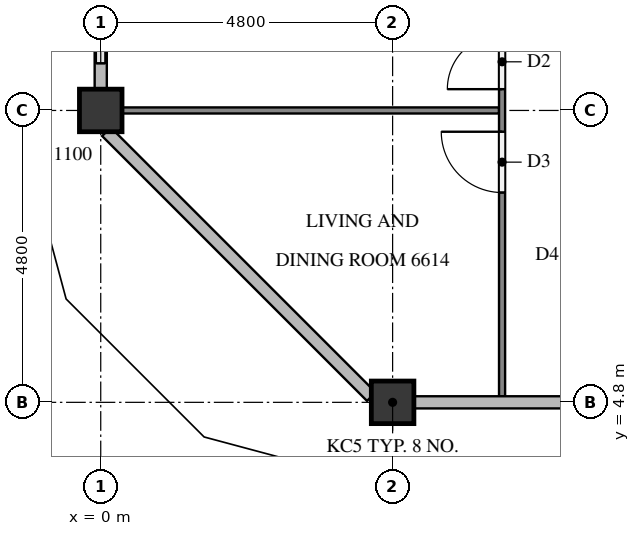
"""IFC4 building model, lengths in metres.
Left out: names, types, materials, properties, quantities, classifications, styles, units other than length and angle.
Written with IfcOpenShell. Run it as: python <this file> out.ifc"""

import sys

from ifc_helpers import new_model, si_unit, direction, frame, frame_2d, origin, origin_2d, place, context, subcontext, project, spatial, rectangle, extrude, element, fill, save


model = new_model("IFC4")
c1 = context("Model", 3, precision=1e-05, world=origin(), true_north=direction((0.0, 1.0)))
c2 = subcontext(c1, "Body", "Model", "MODEL_VIEW")
j1 = project(units=[si_unit("LENGTHUNIT", "METRE"), si_unit("PLANEANGLEUNIT", "RADIAN")], contexts=[c1])
p1 = place(None, origin())
s1 = spatial("IfcSite", under=j1, at=p1, CompositionType="ELEMENT")
p2 = place(p1, origin())
s2 = spatial("IfcBuilding", under=s1, at=p2, CompositionType="ELEMENT")
p3 = place(p2, frame((0.0, 0.0, 252.7)))
s3 = spatial("IfcBuildingStorey", under=s2, at=p3, CompositionType="ELEMENT", Elevation=252.7)
for number, where, z_axis, x_axis in (
    (1, (4.8, 4.8, 0.0), (0.0, 0.0, 1.0), (1.0, 0.0, 0.0)),
    (2, (0.0, 9.6, 0.0), (0.0, 0.0, 1.0), (1.0, 0.0, 0.0)),
):
    element("IfcColumn", number, at=place(p3, frame(where, z_axis=z_axis, x_axis=x_axis)), inside=s3, PredefinedType="COLUMN", context=c2, shape_type="SweptSolid", body=[
        extrude(rectangle(XDim=0.7, YDim=0.7, at=origin_2d()), origin(), (0.0, 0.0, 1.0), 3.2),
    ])
p4 = place(p3, frame((0.0, 12.0, 0.0), z_axis=(0.0, 0.0, 1.0), x_axis=(0.0, -1.0, 0.0)))
e3 = element("IfcWall", 3, at=p4, inside=s3, PredefinedType="SOLIDWALL", context=c2, shape_type="SweptSolid", body=[
    extrude(rectangle(XDim=2.05, YDim=0.15, at=frame_2d((1.025, 0.0))), origin(), (0.0, 0.0, 1.0), 3.2),
])
p5 = place(p4, frame((0.425, 0.0, 0.9)))
e4 = element("IfcOpeningElement", 4, at=p5, cuts=e3, PredefinedType="OPENING", context=c2, shape_type="SweptSolid", body=[
    extrude(rectangle(XDim=1.2, YDim=1.4, at=frame_2d((0.6, 0.7))), frame((0.0, 0.085, 0.0), z_axis=(0.0, -1.0, 0.0), x_axis=(1.0, 0.0, 0.0)), (0.0, 0.0, 1.0), 0.17),
])
p6 = place(p3, frame((6.55, 9.6, 0.0), z_axis=(0.0, 0.0, 1.0), x_axis=(-1.0, 0.0, 0.0)))
e5 = element("IfcWall", 5, at=p6, inside=s3, PredefinedType="PARTITIONING", context=c2, shape_type="SweptSolid", body=[
    extrude(rectangle(XDim=6.2, YDim=0.1, at=frame_2d((3.1, 0.0))), origin(), (0.0, 0.0, 1.0), 3.2),
])
p7 = place(p3, frame((6.6, 4.9, 0.0), z_axis=(0.0, 0.0, 1.0), x_axis=(0.0, 1.0, 0.0)))
e6 = element("IfcWall", 6, at=p7, inside=s3, PredefinedType="PARTITIONING", context=c2, shape_type="SweptSolid", body=[
    extrude(rectangle(XDim=9.4, YDim=0.1, at=frame_2d((4.7, 0.0))), origin(), (0.0, 0.0, 1.0), 3.2),
])
p8 = place(p7, frame((5.05, 0.0, 0.0)))
e7 = element("IfcOpeningElement", 7, at=p8, cuts=e6, PredefinedType="OPENING", context=c2, shape_type="SweptSolid", body=[
    extrude(rectangle(XDim=0.9, YDim=2.1, at=frame_2d((0.45, 1.05))), frame((0.0, 0.06, 0.0), z_axis=(0.0, -1.0, 0.0), x_axis=(1.0, 0.0, 0.0)), (0.0, 0.0, 1.0), 0.12),
])
p9 = place(p7, frame((3.35, 0.0, 0.0)))
e8 = element("IfcOpeningElement", 8, at=p9, cuts=e6, PredefinedType="OPENING", context=c2, shape_type="SweptSolid", body=[
    extrude(rectangle(XDim=1.0, YDim=2.1, at=frame_2d((0.5, 1.05))), frame((0.0, 0.06, 0.0), z_axis=(0.0, -1.0, 0.0), x_axis=(1.0, 0.0, 0.0)), (0.0, 0.0, 1.0), 0.12),
])
p10 = place(p5, origin())
e9 = element("IfcWindow", 9, at=p10, inside=s3, PartitioningType="SINGLE_PANEL", PredefinedType="WINDOW", context=c2, shape_type="SweptSolid", body=[
    extrude(rectangle(XDim=1.2, YDim=1.4, at=frame_2d((0.6, 0.7))), frame((0.0, 0.03, 0.0), z_axis=(0.0, -1.0, 0.0), x_axis=(1.0, 0.0, 0.0)), (0.0, 0.0, 1.0), 0.06),
])
fill(e4, e9)
p11 = place(p8, origin())
e10 = element("IfcDoor", 10, at=p11, inside=s3, OperationType="SINGLE_SWING_LEFT", PredefinedType="DOOR", context=c2, shape_type="SweptSolid", body=[
    extrude(rectangle(XDim=0.9, YDim=2.1, at=frame_2d((0.45, 1.05))), frame((0.0, 0.025, 0.0), z_axis=(0.0, -1.0, 0.0), x_axis=(1.0, 0.0, 0.0)), (0.0, 0.0, 1.0), 0.05),
])
fill(e7, e10)
p12 = place(p9, origin())
e11 = element("IfcDoor", 11, at=p12, inside=s3, OperationType="SINGLE_SWING_RIGHT", PredefinedType="DOOR", context=c2, shape_type="SweptSolid", body=[
    extrude(rectangle(XDim=1.0, YDim=2.1, at=frame_2d((0.5, 1.05))), frame((0.0, 0.025, 0.0), z_axis=(0.0, -1.0, 0.0), x_axis=(1.0, 0.0, 0.0)), (0.0, 0.0, 1.0), 0.05),
])
fill(e8, e11)
save(model, sys.argv[1])
